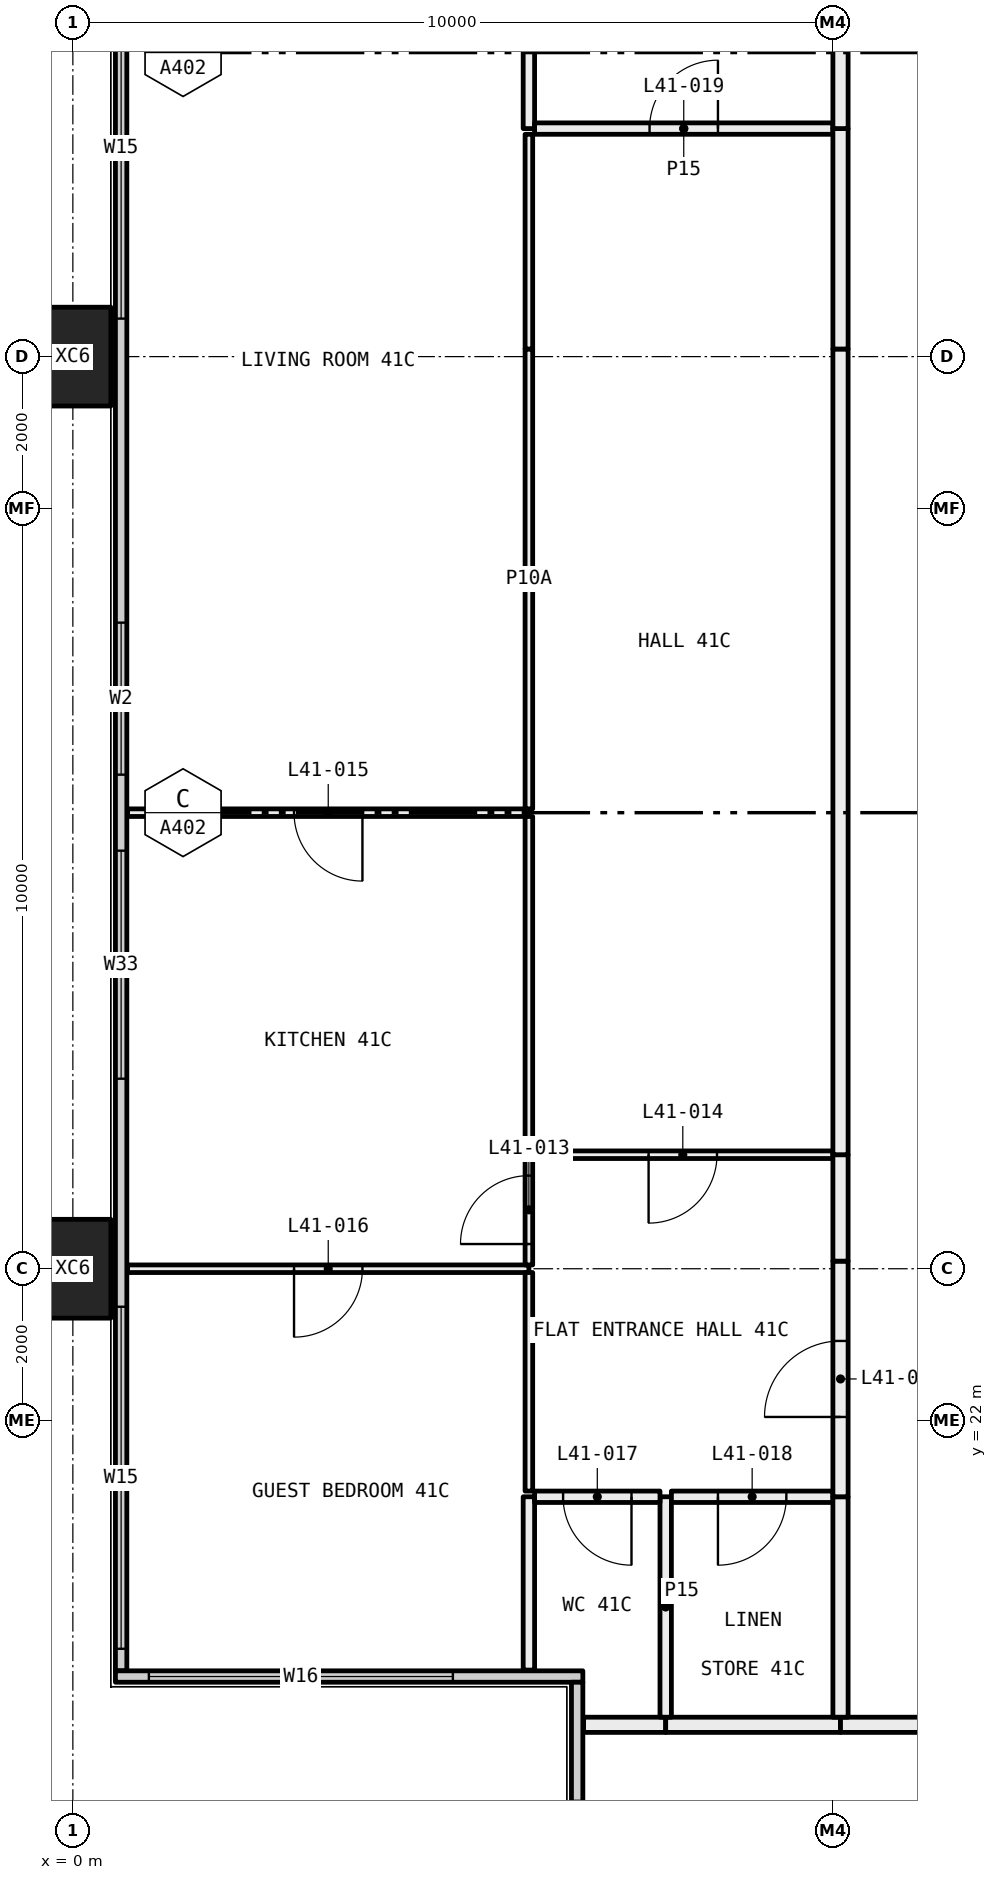
"""IFC4 building model, lengths in metres.
Left out: names, types, materials, properties, quantities, classifications, styles, units other than length and angle.
Written with IfcOpenShell. Run it as: python <this file> out.ifc"""

import sys

from ifc_helpers import new_model, si_unit, direction, frame, frame_2d, origin, origin_2d, place, context, subcontext, project, spatial, rectangle, hollow_rectangle, extrude, element, fill, save


model = new_model("IFC4")
c1 = context("Model", 3, precision=1e-05, world=origin(), true_north=direction((0.0, 1.0)))
c2 = subcontext(c1, "Body", "Model", "MODEL_VIEW")
j1 = project(units=[si_unit("LENGTHUNIT", "METRE"), si_unit("PLANEANGLEUNIT", "RADIAN")], contexts=[c1])
p1 = place(None, origin())
s1 = spatial("IfcSite", under=j1, at=p1, CompositionType="ELEMENT")
p2 = place(p1, origin())
s2 = spatial("IfcBuilding", under=s1, at=p2, CompositionType="ELEMENT")
p3 = place(p2, frame((0.0, 0.0, 158.25)))
s3 = spatial("IfcBuildingStorey", under=s2, at=p3, CompositionType="ELEMENT", Elevation=158.25)
for number, where, z_axis, x_axis in (
    (1, (0.0, 24.0, -0.4), (0.0, 0.0, 1.0), (0.0, 1.0, 0.0)),
    (2, (0.0, 36.0, -0.4), (0.0, 0.0, 1.0), (0.0, 1.0, 0.0)),
):
    element("IfcColumn", number, at=place(p3, frame(where, z_axis=z_axis, x_axis=x_axis)), inside=s3, PredefinedType="COLUMN", context=c2, shape_type="SweptSolid", body=[
        extrude(hollow_rectangle(XDim=1.3, YDim=1.0, WallThickness=0.05, at=origin_2d()), origin(), (0.0, 0.0, 1.0), 3.45),
    ])
p4 = place(p3, frame((0.635, 18.71, 0.0), z_axis=(0.0, 0.0, 1.0), x_axis=(0.0, 1.0, 0.0)))
e3 = element("IfcWall", 3, at=p4, inside=s3, PredefinedType="ELEMENTEDWALL", context=c2, shape_type="SweptSolid", body=[
    extrude(rectangle(XDim=22.58, YDim=0.15, at=frame_2d((11.29, 0.0))), origin(), (0.0, 0.0, 1.0), 3.05),
])
p5 = place(p4, frame((0.29, 0.0, 0.45)))
e4 = element("IfcOpeningElement", 4, at=p5, cuts=e3, PredefinedType="OPENING", context=c2, shape_type="SweptSolid", body=[
    extrude(rectangle(XDim=4.5, YDim=2.55, at=frame_2d((2.25, 1.275))), frame((0.0, 0.085, 0.0), z_axis=(0.0, -1.0, 0.0), x_axis=(1.0, 0.0, 0.0)), (0.0, 0.0, 1.0), 0.17),
])
p6 = place(p4, frame((7.79, 0.0, 0.45)))
e5 = element("IfcOpeningElement", 5, at=p6, cuts=e3, PredefinedType="OPENING", context=c2, shape_type="SweptSolid", body=[
    extrude(rectangle(XDim=3.0, YDim=2.55, at=frame_2d((1.5, 1.275))), frame((0.0, 0.085, 0.0), z_axis=(0.0, -1.0, 0.0), x_axis=(1.0, 0.0, 0.0)), (0.0, 0.0, 1.0), 0.17),
])
p7 = place(p4, frame((11.79, 0.0, 0.45)))
e6 = element("IfcOpeningElement", 6, at=p7, cuts=e3, PredefinedType="OPENING", context=c2, shape_type="SweptSolid", body=[
    extrude(rectangle(XDim=2.0, YDim=2.55, at=frame_2d((1.0, 1.275))), frame((0.0, 0.085, 0.0), z_axis=(0.0, -1.0, 0.0), x_axis=(1.0, 0.0, 0.0)), (0.0, 0.0, 1.0), 0.17),
])
p8 = place(p4, frame((17.79, 0.0, 0.45)))
e7 = element("IfcOpeningElement", 7, at=p8, cuts=e3, PredefinedType="OPENING", context=c2, shape_type="SweptSolid", body=[
    extrude(rectangle(XDim=4.5, YDim=2.55, at=frame_2d((2.25, 1.275))), frame((0.0, 0.085, 0.0), z_axis=(0.0, -1.0, 0.0), x_axis=(1.0, 0.0, 0.0)), (0.0, 0.0, 1.0), 0.17),
])
p9 = place(p3, frame((0.56, 18.635, 0.0), z_axis=(0.0, 0.0, 1.0), x_axis=(1.0, 0.0, 0.0)))
e8 = element("IfcWall", 8, at=p9, inside=s3, PredefinedType="ELEMENTEDWALL", context=c2, shape_type="SweptSolid", body=[
    extrude(rectangle(XDim=6.15, YDim=0.15, at=frame_2d((3.075, 0.0))), origin(), (0.0, 0.0, 1.0), 3.05),
])
p10 = place(p9, frame((0.44, 0.0, 0.45)))
e9 = element("IfcOpeningElement", 9, at=p10, cuts=e8, PredefinedType="OPENING", context=c2, shape_type="SweptSolid", body=[
    extrude(rectangle(XDim=4.0, YDim=2.55, at=frame_2d((2.0, 1.275))), frame((0.0, 0.085, 0.0), z_axis=(0.0, -1.0, 0.0), x_axis=(1.0, 0.0, 0.0)), (0.0, 0.0, 1.0), 0.17),
])
p11 = place(p3, frame((6.635, 12.71, 0.0), z_axis=(0.0, 0.0, 1.0), x_axis=(0.0, 1.0, 0.0)))
e10 = element("IfcWall", 10, at=p11, inside=s3, PredefinedType="ELEMENTEDWALL", context=c2, shape_type="SweptSolid", body=[
    extrude(rectangle(XDim=5.85, YDim=0.15, at=frame_2d((2.925, 0.0))), origin(), (0.0, 0.0, 1.0), 3.05),
])
p12 = place(p11, frame((0.29, 0.0, 0.45)))
e11 = element("IfcOpeningElement", 11, at=p12, cuts=e10, PredefinedType="OPENING", context=c2, shape_type="SweptSolid", body=[
    extrude(rectangle(XDim=4.0, YDim=2.55, at=frame_2d((2.0, 1.275))), frame((0.0, 0.085, 0.0), z_axis=(0.0, -1.0, 0.0), x_axis=(1.0, 0.0, 0.0)), (0.0, 0.0, 1.0), 0.17),
])
p13 = place(p3, frame((7.8, 18.0, 0.0), z_axis=(0.0, 0.0, 1.0), x_axis=(-1.0, 0.0, 0.0)))
e12 = element("IfcWall", 12, at=p13, inside=s3, PredefinedType="PARTITIONING", context=c2, shape_type="SweptSolid", body=[
    extrude(rectangle(XDim=1.08, YDim=0.2, at=frame_2d((0.54, 0.0))), origin(), (0.0, 0.0, 1.0), 3.05),
])
p14 = place(p3, frame((10.1, 18.0, 0.0), z_axis=(0.0, 0.0, 1.0), x_axis=(-1.0, 0.0, 0.0)))
e13 = element("IfcWall", 13, at=p14, inside=s3, PredefinedType="PARTITIONING", context=c2, shape_type="SweptSolid", body=[
    extrude(rectangle(XDim=2.3, YDim=0.2, at=frame_2d((1.15, 0.0))), origin(), (0.0, 0.0, 1.0), 3.05),
])
p15 = place(p3, frame((12.0, 18.0, 0.0), z_axis=(0.0, 0.0, 1.0), x_axis=(-1.0, 0.0, 0.0)))
e14 = element("IfcWall", 14, at=p15, inside=s3, PredefinedType="PARTITIONING", context=c2, shape_type="SweptSolid", body=[
    extrude(rectangle(XDim=1.9, YDim=0.2, at=frame_2d((0.95, 0.0))), origin(), (0.0, 0.0, 1.0), 3.05),
])
p16 = place(p3, frame((6.0, 24.0, 0.0), z_axis=(0.0, 0.0, 1.0), x_axis=(-1.0, 0.0, 0.0)))
e15 = element("IfcWall", 15, at=p16, inside=s3, PredefinedType="PARTITIONING", context=c2, shape_type="SweptSolid", body=[
    extrude(rectangle(XDim=5.28, YDim=0.1, at=frame_2d((2.64, 0.0))), origin(), (0.0, 0.0, 1.0), 2.45),
])
p17 = place(p16, frame((2.19, 0.0, 0.0)))
e16 = element("IfcOpeningElement", 16, at=p17, cuts=e15, PredefinedType="OPENING", context=c2, shape_type="SweptSolid", body=[
    extrude(rectangle(XDim=0.9, YDim=2.1, at=frame_2d((0.45, 1.05))), frame((0.0, 0.06, 0.0), z_axis=(0.0, -1.0, 0.0), x_axis=(1.0, 0.0, 0.0)), (0.0, 0.0, 1.0), 0.12),
])
p18 = place(p3, frame((6.0, 18.72, 0.0), z_axis=(0.0, 0.0, 1.0), x_axis=(0.0, 1.0, 0.0)))
e17 = element("IfcWall", 17, at=p18, inside=s3, PredefinedType="PARTITIONING", context=c2, shape_type="SweptSolid", body=[
    extrude(rectangle(XDim=2.28, YDim=0.15, at=frame_2d((1.14, 0.0))), origin(), (0.0, 0.0, 1.0), 3.05),
])
p19 = place(p3, frame((6.0, 21.075, 0.0), z_axis=(0.0, 0.0, 1.0), x_axis=(0.0, 1.0, 0.0)))
e18 = element("IfcWall", 18, at=p19, inside=s3, PredefinedType="PARTITIONING", context=c2, shape_type="SweptSolid", body=[
    extrude(rectangle(XDim=2.875, YDim=0.1, at=frame_2d((1.438, 0.0))), origin(), (0.0, 0.0, 1.0), 2.45),
])
p20 = place(p3, frame((6.0, 30.0, 0.0), z_axis=(0.0, 0.0, 1.0), x_axis=(-1.0, 0.0, 0.0)))
e19 = element("IfcWall", 19, at=p20, inside=s3, PredefinedType="PARTITIONING", context=c2, shape_type="SweptSolid", body=[
    extrude(rectangle(XDim=5.28, YDim=0.1, at=frame_2d((2.64, 0.0))), origin(), (0.0, 0.0, 1.0), 3.05),
])
p21 = place(p20, frame((2.19, 0.0, 0.0)))
e20 = element("IfcOpeningElement", 20, at=p21, cuts=e19, PredefinedType="OPENING", context=c2, shape_type="SweptSolid", body=[
    extrude(rectangle(XDim=0.9, YDim=2.1, at=frame_2d((0.45, 1.05))), frame((0.0, 0.06, 0.0), z_axis=(0.0, -1.0, 0.0), x_axis=(1.0, 0.0, 0.0)), (0.0, 0.0, 1.0), 0.12),
])
p22 = place(p3, frame((6.0, 24.05, 0.0), z_axis=(0.0, 0.0, 1.0), x_axis=(0.0, 1.0, 0.0)))
e21 = element("IfcWall", 21, at=p22, inside=s3, PredefinedType="PARTITIONING", context=c2, shape_type="SweptSolid", body=[
    extrude(rectangle(XDim=1.45, YDim=0.1, at=frame_2d((0.725, 0.0))), origin(), (0.0, 0.0, 1.0), 2.45),
])
p23 = place(p22, frame((0.275, 0.0, 0.0)))
e22 = element("IfcOpeningElement", 22, at=p23, cuts=e21, PredefinedType="OPENING", context=c2, shape_type="SweptSolid", body=[
    extrude(rectangle(XDim=0.9, YDim=2.1, at=frame_2d((0.45, 1.05))), frame((0.0, 0.06, 0.0), z_axis=(0.0, -1.0, 0.0), x_axis=(1.0, 0.0, 0.0)), (0.0, 0.0, 1.0), 0.12),
])
p24 = place(p3, frame((6.0, 25.5, 0.0), z_axis=(0.0, 0.0, 1.0), x_axis=(0.0, 1.0, 0.0)))
e23 = element("IfcWall", 23, at=p24, inside=s3, PredefinedType="PARTITIONING", context=c2, shape_type="SweptSolid", body=[
    extrude(rectangle(XDim=4.45, YDim=0.1, at=frame_2d((2.225, 0.0))), origin(), (0.0, 0.0, 1.0), 3.05),
])
p25 = place(p3, frame((6.0, 30.05, 0.0), z_axis=(0.0, 0.0, 1.0), x_axis=(0.0, 1.0, 0.0)))
e24 = element("IfcWall", 24, at=p25, inside=s3, PredefinedType="PARTITIONING", context=c2, shape_type="SweptSolid", body=[
    extrude(rectangle(XDim=6.05, YDim=0.1, at=frame_2d((3.025, 0.0))), origin(), (0.0, 0.0, 1.0), 2.45),
])
p26 = place(p3, frame((6.0, 36.1, 0.0), z_axis=(0.0, 0.0, 1.0), x_axis=(0.0, 1.0, 0.0)))
e25 = element("IfcWall", 25, at=p26, inside=s3, PredefinedType="PARTITIONING", context=c2, shape_type="SweptSolid", body=[
    extrude(rectangle(XDim=2.825, YDim=0.1, at=frame_2d((1.413, 0.0))), origin(), (0.0, 0.0, 1.0), 3.05),
])
p27 = place(p3, frame((6.0, 39.0, 0.0), z_axis=(0.0, 0.0, 1.0), x_axis=(0.0, 1.0, 0.0)))
e26 = element("IfcWall", 26, at=p27, inside=s3, PredefinedType="PARTITIONING", context=c2, shape_type="SweptSolid", body=[
    extrude(rectangle(XDim=2.28, YDim=0.15, at=frame_2d((1.14, 0.0))), origin(), (0.0, 0.0, 1.0), 3.05),
])
p28 = place(p3, frame((7.8, 18.1, 0.0), z_axis=(0.0, 0.0, 1.0), x_axis=(0.0, 1.0, 0.0)))
e27 = element("IfcWall", 27, at=p28, inside=s3, PredefinedType="PARTITIONING", context=c2, shape_type="SweptSolid", body=[
    extrude(rectangle(XDim=2.9, YDim=0.15, at=frame_2d((1.45, 0.0))), origin(), (0.0, 0.0, 1.0), 3.05),
])
p29 = place(p3, frame((7.725, 21.0, 0.0), z_axis=(0.0, 0.0, 1.0), x_axis=(-1.0, 0.0, 0.0)))
e28 = element("IfcWall", 28, at=p29, inside=s3, PredefinedType="PARTITIONING", context=c2, shape_type="SweptSolid", body=[
    extrude(rectangle(XDim=1.65, YDim=0.15, at=frame_2d((0.825, 0.0))), origin(), (0.0, 0.0, 1.0), 3.05),
])
p30 = place(p29, frame((0.375, 0.0, 0.0)))
e29 = element("IfcOpeningElement", 29, at=p30, cuts=e28, PredefinedType="OPENING", context=c2, shape_type="SweptSolid", body=[
    extrude(rectangle(XDim=0.9, YDim=2.1, at=frame_2d((0.45, 1.05))), frame((0.0, 0.085, 0.0), z_axis=(0.0, -1.0, 0.0), x_axis=(1.0, 0.0, 0.0)), (0.0, 0.0, 1.0), 0.17),
])
p31 = place(p3, frame((10.0, 21.0, 0.0), z_axis=(0.0, 0.0, 1.0), x_axis=(-1.0, 0.0, 0.0)))
e30 = element("IfcWall", 30, at=p31, inside=s3, PredefinedType="PARTITIONING", context=c2, shape_type="SweptSolid", body=[
    extrude(rectangle(XDim=2.125, YDim=0.15, at=frame_2d((1.062, 0.0))), origin(), (0.0, 0.0, 1.0), 3.05),
])
p32 = place(p31, frame((0.613, 0.0, 0.0)))
e31 = element("IfcOpeningElement", 31, at=p32, cuts=e30, PredefinedType="OPENING", context=c2, shape_type="SweptSolid", body=[
    extrude(rectangle(XDim=0.9, YDim=2.1, at=frame_2d((0.45, 1.05))), frame((0.0, 0.085, 0.0), z_axis=(0.0, -1.0, 0.0), x_axis=(1.0, 0.0, 0.0)), (0.0, 0.0, 1.0), 0.17),
])
p33 = place(p3, frame((10.1, 18.1, 0.0), z_axis=(0.0, 0.0, 1.0), x_axis=(0.0, 1.0, 0.0)))
e32 = element("IfcWall", 32, at=p33, inside=s3, PredefinedType="PARTITIONING", context=c2, shape_type="SweptSolid", body=[
    extrude(rectangle(XDim=2.9, YDim=0.2, at=frame_2d((1.45, 0.0))), origin(), (0.0, 0.0, 1.0), 3.05),
])
p34 = place(p3, frame((10.0, 25.5, 0.0), z_axis=(0.0, 0.0, 1.0), x_axis=(-1.0, 0.0, 0.0)))
e33 = element("IfcWall", 33, at=p34, inside=s3, PredefinedType="PARTITIONING", context=c2, shape_type="SweptSolid", body=[
    extrude(rectangle(XDim=3.95, YDim=0.1, at=frame_2d((1.975, 0.0))), origin(), (0.0, 0.0, 1.0), 3.05),
])
p35 = place(p34, frame((1.525, 0.0, 0.0)))
e34 = element("IfcOpeningElement", 34, at=p35, cuts=e33, PredefinedType="OPENING", context=c2, shape_type="SweptSolid", body=[
    extrude(rectangle(XDim=0.9, YDim=2.1, at=frame_2d((0.45, 1.05))), frame((0.0, 0.06, 0.0), z_axis=(0.0, -1.0, 0.0), x_axis=(1.0, 0.0, 0.0)), (0.0, 0.0, 1.0), 0.12),
])
p36 = place(p3, frame((10.1, 21.0, 0.0), z_axis=(0.0, 0.0, 1.0), x_axis=(0.0, 1.0, 0.0)))
e35 = element("IfcWall", 35, at=p36, inside=s3, PredefinedType="PARTITIONING", context=c2, shape_type="SweptSolid", body=[
    extrude(rectangle(XDim=3.1, YDim=0.2, at=frame_2d((1.55, 0.0))), origin(), (0.0, 0.0, 1.0), 2.45),
])
p37 = place(p36, frame((1.05, 0.0, 0.0)))
e36 = element("IfcOpeningElement", 36, at=p37, cuts=e35, PredefinedType="OPENING", context=c2, shape_type="SweptSolid", body=[
    extrude(rectangle(XDim=1.0, YDim=2.1, at=frame_2d((0.5, 1.05))), frame((0.0, 0.11, 0.0), z_axis=(0.0, -1.0, 0.0), x_axis=(1.0, 0.0, 0.0)), (0.0, 0.0, 1.0), 0.22),
])
p38 = place(p3, frame((10.1, 24.1, 0.0), z_axis=(0.0, 0.0, 1.0), x_axis=(0.0, 1.0, 0.0)))
e37 = element("IfcWall", 37, at=p38, inside=s3, PredefinedType="PARTITIONING", context=c2, shape_type="SweptSolid", body=[
    extrude(rectangle(XDim=1.4, YDim=0.2, at=frame_2d((0.7, 0.0))), origin(), (0.0, 0.0, 1.0), 3.05),
])
p39 = place(p3, frame((10.0, 39.0, 0.0), z_axis=(0.0, 0.0, 1.0), x_axis=(-1.0, 0.0, 0.0)))
e38 = element("IfcWall", 38, at=p39, inside=s3, PredefinedType="PARTITIONING", context=c2, shape_type="SweptSolid", body=[
    extrude(rectangle(XDim=3.925, YDim=0.15, at=frame_2d((1.962, 0.0))), origin(), (0.0, 0.0, 1.0), 3.05),
])
p40 = place(p39, frame((1.512, 0.0, 0.0)))
e39 = element("IfcOpeningElement", 39, at=p40, cuts=e38, PredefinedType="OPENING", context=c2, shape_type="SweptSolid", body=[
    extrude(rectangle(XDim=0.9, YDim=2.1, at=frame_2d((0.45, 1.05))), frame((0.0, 0.085, 0.0), z_axis=(0.0, -1.0, 0.0), x_axis=(1.0, 0.0, 0.0)), (0.0, 0.0, 1.0), 0.17),
])
p41 = place(p3, frame((10.1, 25.5, 0.0), z_axis=(0.0, 0.0, 1.0), x_axis=(0.0, 1.0, 0.0)))
e40 = element("IfcWall", 40, at=p41, inside=s3, PredefinedType="PARTITIONING", context=c2, shape_type="SweptSolid", body=[
    extrude(rectangle(XDim=10.6, YDim=0.2, at=frame_2d((5.3, 0.0))), origin(), (0.0, 0.0, 1.0), 2.45),
])
for number, where, z_axis, x_axis in (
    (41, (10.1, 36.1, 0.0), (0.0, 0.0, 1.0), (0.0, 1.0, 0.0)),
    (42, (10.1, 39.0, 0.0), (0.0, 0.0, 1.0), (0.0, 1.0, 0.0)),
):
    element("IfcWall", number, at=place(p3, frame(where, z_axis=z_axis, x_axis=x_axis)), inside=s3, PredefinedType="PARTITIONING", context=c2, shape_type="SweptSolid", body=[
        extrude(rectangle(XDim=2.9, YDim=0.2, at=frame_2d((1.45, 0.0))), origin(), (0.0, 0.0, 1.0), 3.05),
    ])
p42 = place(p5, origin())
e43 = element("IfcWindow", 43, at=p42, inside=s3, PartitioningType="SINGLE_PANEL", PredefinedType="WINDOW", context=c2, shape_type="SweptSolid", body=[
    extrude(rectangle(XDim=4.5, YDim=2.55, at=frame_2d((2.25, 1.275))), frame((0.0, 0.03, 0.0), z_axis=(0.0, -1.0, 0.0), x_axis=(1.0, 0.0, 0.0)), (0.0, 0.0, 1.0), 0.06),
])
fill(e4, e43)
p43 = place(p6, origin())
e44 = element("IfcWindow", 44, at=p43, inside=s3, PartitioningType="SINGLE_PANEL", PredefinedType="WINDOW", context=c2, shape_type="SweptSolid", body=[
    extrude(rectangle(XDim=3.0, YDim=2.55, at=frame_2d((1.5, 1.275))), frame((0.0, 0.03, 0.0), z_axis=(0.0, -1.0, 0.0), x_axis=(1.0, 0.0, 0.0)), (0.0, 0.0, 1.0), 0.06),
])
fill(e5, e44)
p44 = place(p7, origin())
e45 = element("IfcWindow", 45, at=p44, inside=s3, PartitioningType="SINGLE_PANEL", PredefinedType="WINDOW", context=c2, shape_type="SweptSolid", body=[
    extrude(rectangle(XDim=2.0, YDim=2.55, at=frame_2d((1.0, 1.275))), frame((0.0, 0.03, 0.0), z_axis=(0.0, -1.0, 0.0), x_axis=(1.0, 0.0, 0.0)), (0.0, 0.0, 1.0), 0.06),
])
fill(e6, e45)
p45 = place(p8, origin())
e46 = element("IfcWindow", 46, at=p45, inside=s3, PartitioningType="SINGLE_PANEL", PredefinedType="WINDOW", context=c2, shape_type="SweptSolid", body=[
    extrude(rectangle(XDim=4.5, YDim=2.55, at=frame_2d((2.25, 1.275))), frame((0.0, 0.03, 0.0), z_axis=(0.0, -1.0, 0.0), x_axis=(1.0, 0.0, 0.0)), (0.0, 0.0, 1.0), 0.06),
])
fill(e7, e46)
p46 = place(p10, origin())
e47 = element("IfcWindow", 47, at=p46, inside=s3, PartitioningType="SINGLE_PANEL", PredefinedType="WINDOW", context=c2, shape_type="SweptSolid", body=[
    extrude(rectangle(XDim=4.0, YDim=2.55, at=frame_2d((2.0, 1.275))), frame((0.0, 0.03, 0.0), z_axis=(0.0, -1.0, 0.0), x_axis=(1.0, 0.0, 0.0)), (0.0, 0.0, 1.0), 0.06),
])
fill(e9, e47)
p47 = place(p37, origin())
e48 = element("IfcDoor", 48, at=p47, inside=s3, OperationType="SINGLE_SWING_RIGHT", PredefinedType="DOOR", context=c2, shape_type="SweptSolid", body=[
    extrude(rectangle(XDim=1.0, YDim=2.1, at=frame_2d((0.5, 1.05))), frame((0.0, 0.025, 0.0), z_axis=(0.0, -1.0, 0.0), x_axis=(1.0, 0.0, 0.0)), (0.0, 0.0, 1.0), 0.05),
])
fill(e36, e48)
p48 = place(p23, origin())
e49 = element("IfcDoor", 49, at=p48, inside=s3, OperationType="SINGLE_SWING_RIGHT", PredefinedType="DOOR", context=c2, shape_type="SweptSolid", body=[
    extrude(rectangle(XDim=0.9, YDim=2.1, at=frame_2d((0.45, 1.05))), frame((0.0, 0.025, 0.0), z_axis=(0.0, -1.0, 0.0), x_axis=(1.0, 0.0, 0.0)), (0.0, 0.0, 1.0), 0.05),
])
fill(e22, e49)
p49 = place(p35, origin())
e50 = element("IfcDoor", 50, at=p49, inside=s3, OperationType="SINGLE_SWING_LEFT", PredefinedType="DOOR", context=c2, shape_type="SweptSolid", body=[
    extrude(rectangle(XDim=0.9, YDim=2.1, at=frame_2d((0.45, 1.05))), frame((0.0, 0.025, 0.0), z_axis=(0.0, -1.0, 0.0), x_axis=(1.0, 0.0, 0.0)), (0.0, 0.0, 1.0), 0.05),
])
fill(e34, e50)
p50 = place(p21, origin())
e51 = element("IfcDoor", 51, at=p50, inside=s3, OperationType="SINGLE_SWING_RIGHT", PredefinedType="DOOR", context=c2, shape_type="SweptSolid", body=[
    extrude(rectangle(XDim=0.9, YDim=2.1, at=frame_2d((0.45, 1.05))), frame((0.0, 0.025, 0.0), z_axis=(0.0, -1.0, 0.0), x_axis=(1.0, 0.0, 0.0)), (0.0, 0.0, 1.0), 0.05),
])
fill(e20, e51)
p51 = place(p17, origin())
e52 = element("IfcDoor", 52, at=p51, inside=s3, OperationType="SINGLE_SWING_LEFT", PredefinedType="DOOR", context=c2, shape_type="SweptSolid", body=[
    extrude(rectangle(XDim=0.9, YDim=2.1, at=frame_2d((0.45, 1.05))), frame((0.0, 0.025, 0.0), z_axis=(0.0, -1.0, 0.0), x_axis=(1.0, 0.0, 0.0)), (0.0, 0.0, 1.0), 0.05),
])
fill(e16, e52)
p52 = place(p30, origin())
e53 = element("IfcDoor", 53, at=p52, inside=s3, OperationType="SINGLE_SWING_RIGHT", PredefinedType="DOOR", context=c2, shape_type="SweptSolid", body=[
    extrude(rectangle(XDim=0.9, YDim=2.1, at=frame_2d((0.45, 1.05))), frame((0.0, 0.025, 0.0), z_axis=(0.0, -1.0, 0.0), x_axis=(1.0, 0.0, 0.0)), (0.0, 0.0, 1.0), 0.05),
])
fill(e29, e53)
p53 = place(p32, origin())
e54 = element("IfcDoor", 54, at=p53, inside=s3, OperationType="SINGLE_SWING_LEFT", PredefinedType="DOOR", context=c2, shape_type="SweptSolid", body=[
    extrude(rectangle(XDim=0.9, YDim=2.1, at=frame_2d((0.45, 1.05))), frame((0.0, 0.025, 0.0), z_axis=(0.0, -1.0, 0.0), x_axis=(1.0, 0.0, 0.0)), (0.0, 0.0, 1.0), 0.05),
])
fill(e31, e54)
p54 = place(p40, frame((0.9, 0.0, 0.0), x_axis=(-1.0, 0.0, 0.0)))
e55 = element("IfcDoor", 55, at=p54, inside=s3, OperationType="SINGLE_SWING_LEFT", PredefinedType="DOOR", context=c2, shape_type="SweptSolid", body=[
    extrude(rectangle(XDim=0.9, YDim=2.1, at=frame_2d((0.45, 1.05))), frame((0.0, 0.025, 0.0), z_axis=(0.0, -1.0, 0.0), x_axis=(1.0, 0.0, 0.0)), (0.0, 0.0, 1.0), 0.05),
])
fill(e39, e55)
save(model, sys.argv[1])
